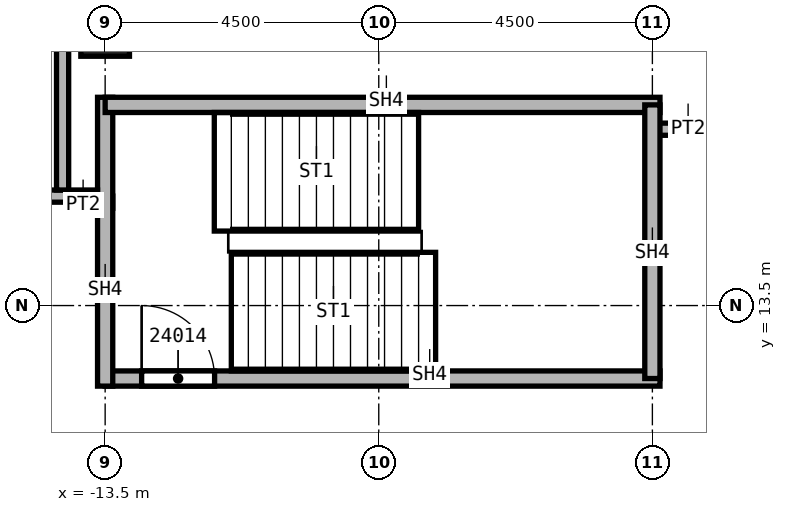
"""IFC4 building model, lengths in metres.
Left out: names, types, materials, properties, quantities, classifications, styles, units other than length and angle.
Written with IfcOpenShell. Run it as: python <this file> out.ifc"""

import sys

from ifc_helpers import new_model, si_unit, direction, frame, frame_2d, origin, origin_2d, place, context, subcontext, project, spatial, rectangle, extrude, element, fill, save


model = new_model("IFC4")
c1 = context("Model", 3, precision=1e-05, world=origin(), true_north=direction((0.0, 1.0)))
c2 = subcontext(c1, "Body", "Model", "MODEL_VIEW")
j1 = project(units=[si_unit("LENGTHUNIT", "METRE"), si_unit("PLANEANGLEUNIT", "RADIAN")], contexts=[c1])
p1 = place(None, origin())
s1 = spatial("IfcSite", under=j1, at=p1, CompositionType="ELEMENT")
p2 = place(p1, origin())
s2 = spatial("IfcBuilding", under=s1, at=p2, CompositionType="ELEMENT")
p3 = place(p2, frame((0.0, 0.0, 342.0)))
s3 = spatial("IfcBuildingStorey", under=s2, at=p3, CompositionType="ELEMENT", Elevation=342.0)
p4 = place(p3, frame((-13.5, 18.0, 0.0), z_axis=(0.0, 0.0, 1.0), x_axis=(1.0, 0.0, 0.0)))
e1 = element("IfcColumn", 1, at=p4, inside=s3, PredefinedType="COLUMN", context=c2, shape_type="SweptSolid", body=[
    extrude(rectangle(XDim=0.8, YDim=0.8, at=origin_2d()), origin(), (0.0, 0.0, 1.0), 3.74),
])
p5 = place(p3, frame((-14.1, 15.2, 0.0), z_axis=(0.0, 0.0, 1.0), x_axis=(1.0, 0.0, 0.0)))
e2 = element("IfcWall", 2, at=p5, inside=s3, PredefinedType="PARTITIONING", context=c2, shape_type="SweptSolid", body=[
    extrude(rectangle(XDim=0.725, YDim=0.2, at=frame_2d((0.363, 0.0))), origin(), (0.0, 0.0, 1.0), 3.74),
])
p6 = place(p3, frame((-4.5, 16.4, 0.0), z_axis=(0.0, 0.0, 1.0), x_axis=(1.0, 0.0, 0.0)))
e3 = element("IfcWall", 3, at=p6, inside=s3, PredefinedType="PARTITIONING", context=c2, shape_type="SweptSolid", body=[
    extrude(rectangle(XDim=1.05, YDim=0.2, at=frame_2d((0.525, 0.0))), origin(), (0.0, 0.0, 1.0), 3.74),
])
p7 = place(p3, frame((-13.5, 12.3, 0.0), z_axis=(0.0, 0.0, 1.0), x_axis=(1.0, 0.0, 0.0)))
e4 = element("IfcWall", 4, at=p7, inside=s3, PredefinedType="SOLIDWALL", context=c2, shape_type="SweptSolid", body=[
    extrude(rectangle(XDim=9.125, YDim=0.25, at=frame_2d((4.562, 0.0))), origin(), (0.0, 0.0, 1.0), 3.74),
])
p8 = place(p7, frame((0.6, 0.0, 0.0)))
e5 = element("IfcOpeningElement", 5, at=p8, cuts=e4, PredefinedType="OPENING", context=c2, shape_type="SweptSolid", body=[
    extrude(rectangle(XDim=1.2, YDim=2.1, at=frame_2d((0.6, 1.05))), frame((0.0, 0.125, 0.0), z_axis=(0.0, -1.0, 0.0), x_axis=(1.0, 0.0, 0.0)), (0.0, 0.0, 1.0), 0.25),
])
p9 = place(p3, frame((-13.5, 12.175, 0.0), z_axis=(0.0, 0.0, 1.0), x_axis=(0.0, 1.0, 0.0)))
e6 = element("IfcWall", 6, at=p9, inside=s3, PredefinedType="SOLIDWALL", context=c2, shape_type="SweptSolid", body=[
    extrude(rectangle(XDim=4.75, YDim=0.25, at=frame_2d((2.375, 0.0))), origin(), (0.0, 0.0, 1.0), 3.74),
])
p10 = place(p3, frame((-13.5, 16.8, 0.0), z_axis=(0.0, 0.0, 1.0), x_axis=(1.0, 0.0, 0.0)))
e7 = element("IfcWall", 7, at=p10, inside=s3, PredefinedType="SOLIDWALL", context=c2, shape_type="SweptSolid", body=[
    extrude(rectangle(XDim=9.125, YDim=0.25, at=frame_2d((4.562, 0.0))), origin(), (0.0, 0.0, 1.0), 3.74),
])
p11 = place(p3, frame((-4.5, 16.8, 0.0), z_axis=(0.0, 0.0, 1.0), x_axis=(0.0, -1.0, 0.0)))
e8 = element("IfcWall", 8, at=p11, inside=s3, PredefinedType="SOLIDWALL", context=c2, shape_type="SweptSolid", body=[
    extrude(rectangle(XDim=4.5, YDim=0.25, at=frame_2d((2.25, 0.0))), origin(), (0.0, 0.0, 1.0), 3.74),
])
p12 = place(p3, frame((-21.9, 15.3, 0.0), z_axis=(0.0, 0.0, 1.0), x_axis=(1.0, 0.0, 0.0)))
e9 = element("IfcWall", 9, at=p12, inside=s3, PredefinedType="SOLIDWALL", context=c2, shape_type="SweptSolid", body=[
    extrude(rectangle(XDim=8.275, YDim=0.2, at=frame_2d((4.137, 0.0))), origin(), (0.0, 0.0, 1.0), 3.74),
])
p13 = place(p12, frame((4.8, 0.0, 0.0)))
e10 = element("IfcOpeningElement", 10, at=p13, cuts=e9, PredefinedType="OPENING", context=c2, shape_type="SweptSolid", body=[
    extrude(rectangle(XDim=1.2, YDim=2.1, at=frame_2d((0.6, 1.05))), frame((0.0, 0.1, 0.0), z_axis=(0.0, -1.0, 0.0), x_axis=(1.0, 0.0, 0.0)), (0.0, 0.0, 1.0), 0.2),
])
p14 = place(p3, frame((-14.2, 15.4, 0.0), z_axis=(0.0, 0.0, 1.0), x_axis=(0.0, 1.0, 0.0)))
e11 = element("IfcWall", 11, at=p14, inside=s3, PredefinedType="SOLIDWALL", context=c2, shape_type="SweptSolid", body=[
    extrude(rectangle(XDim=5.9, YDim=0.2, at=frame_2d((2.95, 0.0))), origin(), (0.0, 0.0, 1.0), 3.74),
])
p15 = place(p8, origin())
e12 = element("IfcDoor", 12, at=p15, inside=s3, OperationType="SINGLE_SWING_LEFT", PredefinedType="DOOR", context=c2, shape_type="SweptSolid", body=[
    extrude(rectangle(XDim=1.2, YDim=2.1, at=frame_2d((0.6, 1.05))), frame((0.0, 0.025, 0.0), z_axis=(0.0, -1.0, 0.0), x_axis=(1.0, 0.0, 0.0)), (0.0, 0.0, 1.0), 0.05),
])
fill(e5, e12)
save(model, sys.argv[1])
